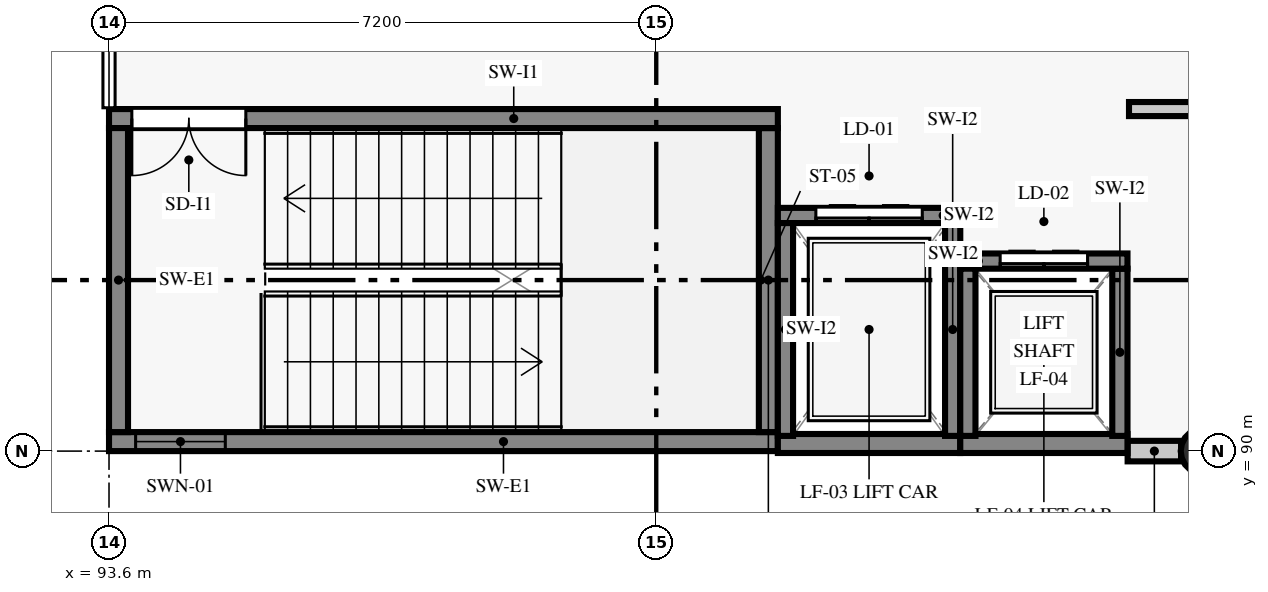
"""IFC4 building model, lengths in metres.
Left out: names, types, materials, properties, quantities, classifications, styles, units other than length and angle.
Written with IfcOpenShell. Run it as: python <this file> out.ifc"""

import sys

from ifc_helpers import new_model, si_unit, direction, frame, frame_2d, origin, origin_2d, place, context, subcontext, project, spatial, rectangle, circle, extrude, element, fill, save


model = new_model("IFC4")
c1 = context("Model", 3, precision=1e-05, world=origin(), true_north=direction((0.0, 1.0)))
c2 = subcontext(c1, "Body", "Model", "MODEL_VIEW")
j1 = project(units=[si_unit("LENGTHUNIT", "METRE"), si_unit("PLANEANGLEUNIT", "RADIAN")], contexts=[c1])
p1 = place(None, origin())
s1 = spatial("IfcSite", under=j1, at=p1, CompositionType="ELEMENT")
p2 = place(p1, origin())
s2 = spatial("IfcBuilding", under=s1, at=p2, CompositionType="ELEMENT")
p3 = place(p2, frame((0.0, 0.0, 13.8)))
s3 = spatial("IfcBuildingStorey", under=s2, at=p3, CompositionType="ELEMENT", Elevation=13.8)
p4 = place(p3, frame((108.0, 90.0, 0.0), z_axis=(0.0, 0.0, 1.0), x_axis=(1.0, 0.0, 0.0)))
e1 = element("IfcColumn", 1, at=p4, inside=s3, PredefinedType="COLUMN", context=c2, shape_type="SweptSolid", body=[
    extrude(circle(Radius=0.3, at=origin_2d()), origin(), (0.0, 0.0, 1.0), 3.92),
])
p5 = place(p3, frame((107.002, 90.0, 0.0), z_axis=(0.0, 0.0, 1.0), x_axis=(1.0, 0.0, 0.0)))
e2 = element("IfcWall", 2, at=p5, inside=s3, PredefinedType="STANDARD", context=c2, shape_type="SweptSolid", body=[
    extrude(rectangle(XDim=0.703, YDim=0.27, at=frame_2d((0.352, 0.0))), origin(), (0.0, 0.0, 1.0), 3.92),
])
p6 = place(p3, frame((93.6, 90.125, 0.0), z_axis=(0.0, 0.0, 1.0), x_axis=(1.0, 0.0, 0.0)))
e3 = element("IfcWall", 3, at=p6, inside=s3, PredefinedType="SHEAR", context=c2, shape_type="SweptSolid", body=[
    extrude(rectangle(XDim=8.8, YDim=0.25, at=frame_2d((4.4, 0.0))), origin(), (0.0, 0.0, 1.0), 3.92),
])
p7 = place(p6, frame((0.35, 0.0, 0.92)))
e4 = element("IfcOpeningElement", 4, at=p7, cuts=e3, PredefinedType="OPENING", context=c2, shape_type="SweptSolid", body=[
    extrude(rectangle(XDim=1.18, YDim=1.48, at=frame_2d((0.59, 0.74))), frame((0.0, 0.135, 0.0), z_axis=(0.0, -1.0, 0.0), x_axis=(1.0, 0.0, 0.0)), (0.0, 0.0, 1.0), 0.27),
])
p8 = place(p3, frame((102.275, 90.25, 0.0), z_axis=(0.0, 0.0, 1.0), x_axis=(0.0, 1.0, 0.0)))
e5 = element("IfcWall", 5, at=p8, inside=s3, PredefinedType="SHEAR", context=c2, shape_type="SweptSolid", body=[
    extrude(rectangle(XDim=4.0, YDim=0.25, at=frame_2d((2.0, 0.0))), origin(), (0.0, 0.0, 1.0), 3.92),
])
p9 = place(p3, frame((102.4, 94.375, 0.0), z_axis=(0.0, 0.0, 1.0), x_axis=(-1.0, 0.0, 0.0)))
e6 = element("IfcWall", 6, at=p9, inside=s3, PredefinedType="SHEAR", context=c2, shape_type="SweptSolid", body=[
    extrude(rectangle(XDim=8.8, YDim=0.25, at=frame_2d((4.4, 0.0))), origin(), (0.0, 0.0, 1.0), 3.92),
])
p10 = place(p9, frame((7.0, 0.0, 0.0)))
e7 = element("IfcOpeningElement", 7, at=p10, cuts=e6, PredefinedType="OPENING", context=c2, shape_type="SweptSolid", body=[
    extrude(rectangle(XDim=1.5, YDim=2.15, at=frame_2d((0.75, 1.075))), frame((0.0, 0.135, 0.0), z_axis=(0.0, -1.0, 0.0), x_axis=(1.0, 0.0, 0.0)), (0.0, 0.0, 1.0), 0.27),
])
p11 = place(p3, frame((93.725, 94.25, 0.0), z_axis=(0.0, 0.0, 1.0), x_axis=(0.0, -1.0, 0.0)))
e8 = element("IfcWall", 8, at=p11, inside=s3, PredefinedType="SHEAR", context=c2, shape_type="SweptSolid", body=[
    extrude(rectangle(XDim=4.0, YDim=0.25, at=frame_2d((2.0, 0.0))), origin(), (0.0, 0.0, 1.0), 3.92),
])
p12 = place(p3, frame((102.4, 90.1, 0.0), z_axis=(0.0, 0.0, 1.0), x_axis=(1.0, 0.0, 0.0)))
e9 = element("IfcWall", 9, at=p12, inside=s3, PredefinedType="SHEAR", context=c2, shape_type="SweptSolid", body=[
    extrude(rectangle(XDim=2.4, YDim=0.25, at=frame_2d((1.2, 0.0))), origin(), (0.0, 0.0, 1.0), 3.92),
])
p13 = place(p3, frame((104.7, 90.2, 0.0), z_axis=(0.0, 0.0, 1.0), x_axis=(0.0, 1.0, 0.0)))
e10 = element("IfcWall", 10, at=p13, inside=s3, PredefinedType="SHEAR", context=c2, shape_type="SweptSolid", body=[
    extrude(rectangle(XDim=2.8, YDim=0.2, at=frame_2d((1.4, 0.0))), origin(), (0.0, 0.0, 1.0), 3.92),
])
p14 = place(p3, frame((104.8, 93.1, 0.0), z_axis=(0.0, 0.0, 1.0), x_axis=(-1.0, 0.0, 0.0)))
e11 = element("IfcWall", 11, at=p14, inside=s3, PredefinedType="SHEAR", context=c2, shape_type="SweptSolid", body=[
    extrude(rectangle(XDim=2.4, YDim=0.2, at=frame_2d((1.2, 0.0))), origin(), (0.0, 0.0, 1.0), 3.92),
])
p15 = place(p14, frame((0.5, 0.0, 0.0)))
e12 = element("IfcOpeningElement", 12, at=p15, cuts=e11, PredefinedType="OPENING", context=c2, shape_type="SweptSolid", body=[
    extrude(rectangle(XDim=1.4, YDim=2.15, at=frame_2d((0.7, 1.075))), frame((0.0, 0.11, 0.0), z_axis=(0.0, -1.0, 0.0), x_axis=(1.0, 0.0, 0.0)), (0.0, 0.0, 1.0), 0.22),
])
p16 = place(p3, frame((102.5, 93.0, 0.0), z_axis=(0.0, 0.0, 1.0), x_axis=(0.0, -1.0, 0.0)))
e13 = element("IfcWall", 13, at=p16, inside=s3, PredefinedType="SHEAR", context=c2, shape_type="SweptSolid", body=[
    extrude(rectangle(XDim=2.8, YDim=0.2, at=frame_2d((1.4, 0.0))), origin(), (0.0, 0.0, 1.0), 3.92),
])
p17 = place(p3, frame((104.8, 90.1, 0.0), z_axis=(0.0, 0.0, 1.0), x_axis=(1.0, 0.0, 0.0)))
e14 = element("IfcWall", 14, at=p17, inside=s3, PredefinedType="SHEAR", context=c2, shape_type="SweptSolid", body=[
    extrude(rectangle(XDim=2.2, YDim=0.25, at=frame_2d((1.1, 0.0))), origin(), (0.0, 0.0, 1.0), 3.92),
])
p18 = place(p3, frame((106.9, 90.2, 0.0), z_axis=(0.0, 0.0, 1.0), x_axis=(0.0, 1.0, 0.0)))
e15 = element("IfcWall", 15, at=p18, inside=s3, PredefinedType="SHEAR", context=c2, shape_type="SweptSolid", body=[
    extrude(rectangle(XDim=2.2, YDim=0.2, at=frame_2d((1.1, 0.0))), origin(), (0.0, 0.0, 1.0), 3.92),
])
p19 = place(p3, frame((107.0, 92.5, 0.0), z_axis=(0.0, 0.0, 1.0), x_axis=(-1.0, 0.0, 0.0)))
e16 = element("IfcWall", 16, at=p19, inside=s3, PredefinedType="SHEAR", context=c2, shape_type="SweptSolid", body=[
    extrude(rectangle(XDim=2.2, YDim=0.2, at=frame_2d((1.1, 0.0))), origin(), (0.0, 0.0, 1.0), 3.92),
])
p20 = place(p19, frame((0.525, 0.0, 0.0)))
e17 = element("IfcOpeningElement", 17, at=p20, cuts=e16, PredefinedType="OPENING", context=c2, shape_type="SweptSolid", body=[
    extrude(rectangle(XDim=1.15, YDim=2.15, at=frame_2d((0.575, 1.075))), frame((0.0, 0.11, 0.0), z_axis=(0.0, -1.0, 0.0), x_axis=(1.0, 0.0, 0.0)), (0.0, 0.0, 1.0), 0.22),
])
p21 = place(p3, frame((104.9, 92.4, 0.0), z_axis=(0.0, 0.0, 1.0), x_axis=(0.0, -1.0, 0.0)))
e18 = element("IfcWall", 18, at=p21, inside=s3, PredefinedType="SHEAR", context=c2, shape_type="SweptSolid", body=[
    extrude(rectangle(XDim=2.2, YDim=0.2, at=frame_2d((1.1, 0.0))), origin(), (0.0, 0.0, 1.0), 3.92),
])
p22 = place(p3, frame((107.02, 94.5, 0.0), z_axis=(0.0, 0.0, 1.0), x_axis=(1.0, 0.0, 0.0)))
e19 = element("IfcWall", 19, at=p22, inside=s3, PredefinedType="PARTITIONING", context=c2, shape_type="SweptSolid", body=[
    extrude(rectangle(XDim=6.56, YDim=0.185, at=frame_2d((3.28, 0.0))), origin(), (0.0, 0.0, 1.0), 3.37),
])
p23 = place(p22, frame((4.03, 0.0, 0.0)))
e20 = element("IfcOpeningElement", 20, at=p23, cuts=e19, PredefinedType="OPENING", context=c2, shape_type="SweptSolid", body=[
    extrude(rectangle(XDim=0.98, YDim=2.08, at=frame_2d((0.49, 1.04))), frame((0.0, 0.103, 0.0), z_axis=(0.0, -1.0, 0.0), x_axis=(1.0, 0.0, 0.0)), (0.0, 0.0, 1.0), 0.205),
])
p24 = place(p7, origin())
e21 = element("IfcWindow", 21, at=p24, inside=s3, PartitioningType="SINGLE_PANEL", PredefinedType="WINDOW", context=c2, shape_type="SweptSolid", body=[
    extrude(rectangle(XDim=1.18, YDim=1.48, at=frame_2d((0.59, 0.74))), frame((0.0, 0.03, 0.0), z_axis=(0.0, -1.0, 0.0), x_axis=(1.0, 0.0, 0.0)), (0.0, 0.0, 1.0), 0.06),
])
fill(e4, e21)
p25 = place(p10, origin())
e22 = element("IfcDoor", 22, at=p25, inside=s3, OperationType="DOUBLE_DOOR_SINGLE_SWING", PredefinedType="DOOR", context=c2, shape_type="SweptSolid", body=[
    extrude(rectangle(XDim=1.5, YDim=2.15, at=frame_2d((0.75, 1.075))), frame((0.0, 0.025, 0.0), z_axis=(0.0, -1.0, 0.0), x_axis=(1.0, 0.0, 0.0)), (0.0, 0.0, 1.0), 0.05),
])
fill(e7, e22)
p26 = place(p15, frame((1.4, 0.0, 0.0), z_axis=(0.0, 0.0, 1.0), x_axis=(-1.0, 0.0, 0.0)))
e23 = element("IfcDoor", 23, at=p26, inside=s3, OperationType="DOUBLE_DOOR_SLIDING", PredefinedType="DOOR", context=c2, shape_type="SweptSolid", body=[
    extrude(rectangle(XDim=1.4, YDim=2.15, at=frame_2d((0.7, 1.075))), frame((0.0, 0.025, 0.0), z_axis=(0.0, -1.0, 0.0), x_axis=(1.0, 0.0, 0.0)), (0.0, 0.0, 1.0), 0.05),
])
fill(e12, e23)
p27 = place(p20, frame((1.15, 0.0, 0.0), z_axis=(0.0, 0.0, 1.0), x_axis=(-1.0, 0.0, 0.0)))
e24 = element("IfcDoor", 24, at=p27, inside=s3, OperationType="DOUBLE_DOOR_SLIDING", PredefinedType="DOOR", context=c2, shape_type="SweptSolid", body=[
    extrude(rectangle(XDim=1.15, YDim=2.15, at=frame_2d((0.575, 1.075))), frame((0.0, 0.025, 0.0), z_axis=(0.0, -1.0, 0.0), x_axis=(1.0, 0.0, 0.0)), (0.0, 0.0, 1.0), 0.05),
])
fill(e17, e24)
save(model, sys.argv[1])
